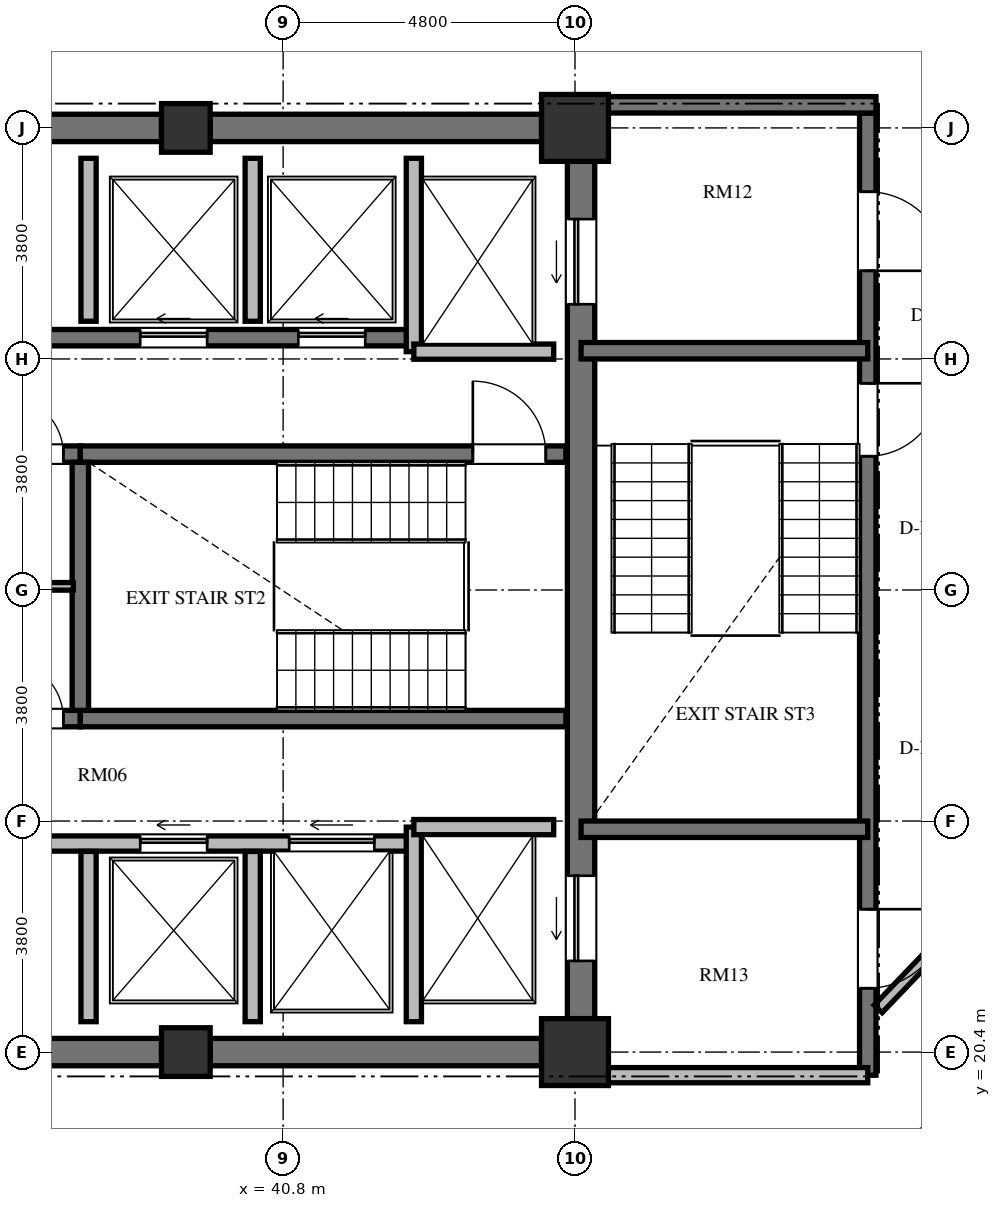
"""IFC4 building model, lengths in metres.
Left out: names, types, materials, properties, quantities, classifications, styles, units other than length and angle.
Written with IfcOpenShell. Run it as: python <this file> out.ifc"""

import sys

from ifc_helpers import new_model, si_unit, direction, frame, frame_2d, origin, origin_2d, place, context, subcontext, project, spatial, rectangle, extrude, element, fill, save


model = new_model("IFC4")
c1 = context("Model", 3, precision=1e-05, world=origin(), true_north=direction((0.0, 1.0)))
c2 = subcontext(c1, "Body", "Model", "MODEL_VIEW")
j1 = project(units=[si_unit("LENGTHUNIT", "METRE"), si_unit("PLANEANGLEUNIT", "RADIAN")], contexts=[c1])
p1 = place(None, origin())
s1 = spatial("IfcSite", under=j1, at=p1, CompositionType="ELEMENT")
p2 = place(p1, origin())
s2 = spatial("IfcBuilding", under=s1, at=p2, CompositionType="ELEMENT")
p3 = place(p2, frame((0.0, 0.0, 262.32)))
s3 = spatial("IfcBuildingStorey", under=s2, at=p3, CompositionType="ELEMENT", Elevation=262.32)
p4 = place(p3, frame((39.2, 20.4, 0.0), z_axis=(0.0, 0.0, 1.0), x_axis=(1.0, 0.0, 0.0)))
e1 = element("IfcColumn", 1, at=p4, inside=s3, PredefinedType="COLUMN", context=c2, shape_type="SweptSolid", body=[
    extrude(rectangle(XDim=0.8, YDim=0.8, at=origin_2d()), origin(), (0.0, 0.0, 1.0), 3.648),
])
for number, where, z_axis, x_axis in (
    (2, (45.6, 20.4, 0.0), (0.0, 0.0, 1.0), (1.0, 0.0, 0.0)),
    (3, (45.6, 35.6, 0.0), (0.0, 0.0, 1.0), (1.0, 0.0, 0.0)),
):
    element("IfcColumn", number, at=place(p3, frame(where, z_axis=z_axis, x_axis=x_axis)), inside=s3, PredefinedType="COLUMN", context=c2, shape_type="SweptSolid", body=[
        extrude(rectangle(XDim=1.1, YDim=1.1, at=origin_2d()), origin(), (0.0, 0.0, 1.0), 3.648),
    ])
p5 = place(p3, frame((39.2, 35.6, 0.0), z_axis=(0.0, 0.0, 1.0), x_axis=(1.0, 0.0, 0.0)))
e4 = element("IfcColumn", 4, at=p5, inside=s3, PredefinedType="COLUMN", context=c2, shape_type="SweptSolid", body=[
    extrude(rectangle(XDim=0.8, YDim=0.8, at=origin_2d()), origin(), (0.0, 0.0, 1.0), 3.648),
])
p6 = place(p3, frame((45.7, 20.95, 0.0), z_axis=(0.0, 0.0, 1.0), x_axis=(0.0, 1.0, 0.0)))
e5 = element("IfcWall", 5, at=p6, inside=s3, PredefinedType="SHEAR", context=c2, shape_type="SweptSolid", body=[
    extrude(rectangle(XDim=14.1, YDim=0.45, at=frame_2d((7.05, 0.0))), origin(), (0.0, 0.0, 1.0), 3.648),
])
p7 = place(p6, frame((11.75, 0.0, 0.0)))
e6 = element("IfcOpeningElement", 6, at=p7, cuts=e5, PredefinedType="OPENING", context=c2, shape_type="SweptSolid", body=[
    extrude(rectangle(XDim=1.4, YDim=2.3, at=frame_2d((0.7, 1.15))), frame((0.0, 0.235, 0.0), z_axis=(0.0, -1.0, 0.0), x_axis=(1.0, 0.0, 0.0)), (0.0, 0.0, 1.0), 0.47),
])
p8 = place(p6, frame((0.95, 0.0, 0.0)))
e7 = element("IfcOpeningElement", 7, at=p8, cuts=e5, PredefinedType="OPENING", context=c2, shape_type="SweptSolid", body=[
    extrude(rectangle(XDim=1.4, YDim=2.3, at=frame_2d((0.7, 1.15))), frame((0.0, 0.235, 0.0), z_axis=(0.0, -1.0, 0.0), x_axis=(1.0, 0.0, 0.0)), (0.0, 0.0, 1.0), 0.47),
])
for number, where, z_axis, x_axis in (
    (8, (33.2, 20.4, 0.0), (0.0, 0.0, 1.0), (1.0, 0.0, 0.0)),
    (9, (33.2, 35.6, 0.0), (0.0, 0.0, 1.0), (1.0, 0.0, 0.0)),
):
    element("IfcWall", number, at=place(p3, frame(where, z_axis=z_axis, x_axis=x_axis)), inside=s3, PredefinedType="SHEAR", context=c2, shape_type="SweptSolid", body=[
        extrude(rectangle(XDim=5.6, YDim=0.45, at=frame_2d((2.8, 0.0))), origin(), (0.0, 0.0, 1.0), 3.648),
    ])
for number, where, z_axis, x_axis in (
    (10, (39.6, 20.4, 0.0), (0.0, 0.0, 1.0), (1.0, 0.0, 0.0)),
    (11, (39.6, 35.6, 0.0), (0.0, 0.0, 1.0), (1.0, 0.0, 0.0)),
):
    element("IfcWall", number, at=place(p3, frame(where, z_axis=z_axis, x_axis=x_axis)), inside=s3, PredefinedType="SHEAR", context=c2, shape_type="SweptSolid", body=[
        extrude(rectangle(XDim=5.45, YDim=0.45, at=frame_2d((2.725, 0.0))), origin(), (0.0, 0.0, 1.0), 3.648),
    ])
p9 = place(p3, frame((34.535, 30.235, 0.0), z_axis=(0.0, 0.0, 1.0), x_axis=(1.0, 0.0, 0.0)))
e12 = element("IfcWall", 12, at=p9, inside=s3, PredefinedType="SHEAR", context=c2, shape_type="SweptSolid", body=[
    extrude(rectangle(XDim=2.93, YDim=0.27, at=frame_2d((1.465, 0.0))), origin(), (0.0, 0.0, 1.0), 3.648),
])
p10 = place(p9, frame((0.255, 0.0, 0.0)))
e13 = element("IfcOpeningElement", 13, at=p10, cuts=e12, PredefinedType="OPENING", context=c2, shape_type="SweptSolid", body=[
    extrude(rectangle(XDim=1.0, YDim=2.1, at=frame_2d((0.5, 1.05))), frame((0.0, 0.145, 0.0), z_axis=(0.0, -1.0, 0.0), x_axis=(1.0, 0.0, 0.0)), (0.0, 0.0, 1.0), 0.29),
])
p11 = place(p9, frame((1.7, 0.0, 0.0)))
e14 = element("IfcOpeningElement", 14, at=p11, cuts=e12, PredefinedType="OPENING", context=c2, shape_type="SweptSolid", body=[
    extrude(rectangle(XDim=0.95, YDim=2.1, at=frame_2d((0.475, 1.05))), frame((0.0, 0.145, 0.0), z_axis=(0.0, -1.0, 0.0), x_axis=(1.0, 0.0, 0.0)), (0.0, 0.0, 1.0), 0.29),
])
p12 = place(p3, frame((37.465, 30.235, 0.0), z_axis=(0.0, 0.0, 1.0), x_axis=(1.0, 0.0, 0.0)))
e15 = element("IfcWall", 15, at=p12, inside=s3, PredefinedType="SHEAR", context=c2, shape_type="SweptSolid", body=[
    extrude(rectangle(XDim=7.985, YDim=0.27, at=frame_2d((3.992, 0.0))), origin(), (0.0, 0.0, 1.0), 3.648),
])
p13 = place(p12, frame((6.455, 0.0, 0.0)))
e16 = element("IfcOpeningElement", 16, at=p13, cuts=e15, PredefinedType="OPENING", context=c2, shape_type="SweptSolid", body=[
    extrude(rectangle(XDim=1.2, YDim=2.15, at=frame_2d((0.6, 1.075))), frame((0.0, 0.145, 0.0), z_axis=(0.0, -1.0, 0.0), x_axis=(1.0, 0.0, 0.0)), (0.0, 0.0, 1.0), 0.29),
])
p14 = place(p3, frame((34.535, 25.885, 0.0), z_axis=(0.0, 0.0, 1.0), x_axis=(1.0, 0.0, 0.0)))
e17 = element("IfcWall", 17, at=p14, inside=s3, PredefinedType="SHEAR", context=c2, shape_type="SweptSolid", body=[
    extrude(rectangle(XDim=2.93, YDim=0.27, at=frame_2d((1.465, 0.0))), origin(), (0.0, 0.0, 1.0), 3.648),
])
p15 = place(p14, frame((0.28, 0.0, 0.0)))
e18 = element("IfcOpeningElement", 18, at=p15, cuts=e17, PredefinedType="OPENING", context=c2, shape_type="SweptSolid", body=[
    extrude(rectangle(XDim=0.95, YDim=2.1, at=frame_2d((0.475, 1.05))), frame((0.0, 0.145, 0.0), z_axis=(0.0, -1.0, 0.0), x_axis=(1.0, 0.0, 0.0)), (0.0, 0.0, 1.0), 0.29),
])
p16 = place(p14, frame((1.7, 0.0, 0.0)))
e19 = element("IfcOpeningElement", 19, at=p16, cuts=e17, PredefinedType="OPENING", context=c2, shape_type="SweptSolid", body=[
    extrude(rectangle(XDim=0.95, YDim=2.1, at=frame_2d((0.475, 1.05))), frame((0.0, 0.145, 0.0), z_axis=(0.0, -1.0, 0.0), x_axis=(1.0, 0.0, 0.0)), (0.0, 0.0, 1.0), 0.29),
])
p17 = place(p3, frame((37.465, 25.885, 0.0), z_axis=(0.0, 0.0, 1.0), x_axis=(1.0, 0.0, 0.0)))
e20 = element("IfcWall", 20, at=p17, inside=s3, PredefinedType="SHEAR", context=c2, shape_type="SweptSolid", body=[
    extrude(rectangle(XDim=7.985, YDim=0.27, at=frame_2d((3.992, 0.0))), origin(), (0.0, 0.0, 1.0), 3.648),
])
p18 = place(p3, frame((37.465, 26.02, 0.0), z_axis=(0.0, 0.0, 1.0), x_axis=(0.0, 1.0, 0.0)))
e21 = element("IfcWall", 21, at=p18, inside=s3, PredefinedType="SHEAR", context=c2, shape_type="SweptSolid", body=[
    extrude(rectangle(XDim=4.08, YDim=0.27, at=frame_2d((2.04, 0.0))), origin(), (0.0, 0.0, 1.0), 3.648),
])
p19 = place(p3, frame((34.65, 28.06, 0.0), z_axis=(0.0, 0.0, 1.0), x_axis=(1.0, 0.0, 0.0)))
e22 = element("IfcWall", 22, at=p19, inside=s3, PredefinedType="PARTITIONING", context=c2, shape_type="SweptSolid", body=[
    extrude(rectangle(XDim=2.7, YDim=0.125, at=frame_2d((1.35, 0.0))), origin(), (0.0, 0.0, 1.0), 3.448),
])
p20 = place(p3, frame((26.55, 32.15, 0.0), z_axis=(0.0, 0.0, 1.0), x_axis=(1.0, 0.0, 0.0)))
e23 = element("IfcWall", 23, at=p20, inside=s3, PredefinedType="SHEAR", context=c2, shape_type="SweptSolid", body=[
    extrude(rectangle(XDim=16.4, YDim=0.27, at=frame_2d((8.2, 0.0))), origin(), (0.0, 0.0, 1.0), 3.648),
])
p21 = place(p20, frame((1.375, 0.0, 0.0)))
e24 = element("IfcOpeningElement", 24, at=p21, cuts=e23, PredefinedType="OPENING", context=c2, shape_type="SweptSolid", body=[
    extrude(rectangle(XDim=1.05, YDim=2.15, at=frame_2d((0.525, 1.075))), frame((0.0, 0.145, 0.0), z_axis=(0.0, -1.0, 0.0), x_axis=(1.0, 0.0, 0.0)), (0.0, 0.0, 1.0), 0.29),
])
p22 = place(p20, frame((4.975, 0.0, 0.0)))
e25 = element("IfcOpeningElement", 25, at=p22, cuts=e23, PredefinedType="OPENING", context=c2, shape_type="SweptSolid", body=[
    extrude(rectangle(XDim=1.05, YDim=2.15, at=frame_2d((0.525, 1.075))), frame((0.0, 0.145, 0.0), z_axis=(0.0, -1.0, 0.0), x_axis=(1.0, 0.0, 0.0)), (0.0, 0.0, 1.0), 0.29),
])
p23 = place(p20, frame((8.625, 0.0, 0.0)))
e26 = element("IfcOpeningElement", 26, at=p23, cuts=e23, PredefinedType="OPENING", context=c2, shape_type="SweptSolid", body=[
    extrude(rectangle(XDim=1.05, YDim=2.15, at=frame_2d((0.525, 1.075))), frame((0.0, 0.145, 0.0), z_axis=(0.0, -1.0, 0.0), x_axis=(1.0, 0.0, 0.0)), (0.0, 0.0, 1.0), 0.29),
])
p24 = place(p20, frame((11.9, 0.0, 0.0)))
e27 = element("IfcOpeningElement", 27, at=p24, cuts=e23, PredefinedType="OPENING", context=c2, shape_type="SweptSolid", body=[
    extrude(rectangle(XDim=1.1, YDim=2.2, at=frame_2d((0.55, 1.1))), frame((0.0, 0.145, 0.0), z_axis=(0.0, -1.0, 0.0), x_axis=(1.0, 0.0, 0.0)), (0.0, 0.0, 1.0), 0.29),
])
p25 = place(p20, frame((14.5, 0.0, 0.0)))
e28 = element("IfcOpeningElement", 28, at=p25, cuts=e23, PredefinedType="OPENING", context=c2, shape_type="SweptSolid", body=[
    extrude(rectangle(XDim=1.1, YDim=2.2, at=frame_2d((0.55, 1.1))), frame((0.0, 0.145, 0.0), z_axis=(0.0, -1.0, 0.0), x_axis=(1.0, 0.0, 0.0)), (0.0, 0.0, 1.0), 0.29),
])
p26 = place(p3, frame((26.75, 23.83, 0.0), z_axis=(0.0, 0.0, 1.0), x_axis=(1.0, 0.0, 0.0)))
e29 = element("IfcWall", 29, at=p26, inside=s3, PredefinedType="SOLIDWALL", context=c2, shape_type="SweptSolid", body=[
    extrude(rectangle(XDim=16.2, YDim=0.25, at=frame_2d((8.1, 0.0))), origin(), (0.0, 0.0, 1.0), 3.448),
])
p27 = place(p26, frame((2.025, 0.0, 0.0)))
e30 = element("IfcOpeningElement", 30, at=p27, cuts=e29, PredefinedType="OPENING", context=c2, shape_type="SweptSolid", body=[
    extrude(rectangle(XDim=1.05, YDim=2.15, at=frame_2d((0.525, 1.075))), frame((0.0, 0.135, 0.0), z_axis=(0.0, -1.0, 0.0), x_axis=(1.0, 0.0, 0.0)), (0.0, 0.0, 1.0), 0.27),
])
p28 = place(p26, frame((7.25, 0.0, 0.0)))
e31 = element("IfcOpeningElement", 31, at=p28, cuts=e29, PredefinedType="OPENING", context=c2, shape_type="SweptSolid", body=[
    extrude(rectangle(XDim=1.4, YDim=2.2, at=frame_2d((0.7, 1.1))), frame((0.0, 0.135, 0.0), z_axis=(0.0, -1.0, 0.0), x_axis=(1.0, 0.0, 0.0)), (0.0, 0.0, 1.0), 0.27),
])
p29 = place(p26, frame((11.7, 0.0, 0.0)))
e32 = element("IfcOpeningElement", 32, at=p29, cuts=e29, PredefinedType="OPENING", context=c2, shape_type="SweptSolid", body=[
    extrude(rectangle(XDim=1.1, YDim=2.2, at=frame_2d((0.55, 1.1))), frame((0.0, 0.135, 0.0), z_axis=(0.0, -1.0, 0.0), x_axis=(1.0, 0.0, 0.0)), (0.0, 0.0, 1.0), 0.27),
])
p30 = place(p26, frame((14.15, 0.0, 0.0)))
e33 = element("IfcOpeningElement", 33, at=p30, cuts=e29, PredefinedType="OPENING", context=c2, shape_type="SweptSolid", body=[
    extrude(rectangle(XDim=1.4, YDim=2.3, at=frame_2d((0.7, 1.15))), frame((0.0, 0.135, 0.0), z_axis=(0.0, -1.0, 0.0), x_axis=(1.0, 0.0, 0.0)), (0.0, 0.0, 1.0), 0.27),
])
p31 = place(p3, frame((42.95, 31.92, 0.0), z_axis=(0.0, 0.0, 1.0), x_axis=(0.0, 1.0, 0.0)))
e34 = element("IfcWall", 34, at=p31, inside=s3, PredefinedType="SOLIDWALL", context=c2, shape_type="SweptSolid", body=[
    extrude(rectangle(XDim=3.18, YDim=0.25, at=frame_2d((1.59, 0.0))), origin(), (0.0, 0.0, 1.0), 3.448),
])
p32 = place(p3, frame((42.95, 31.92, 0.0), z_axis=(0.0, 0.0, 1.0), x_axis=(1.0, 0.0, 0.0)))
e35 = element("IfcWall", 35, at=p32, inside=s3, PredefinedType="SOLIDWALL", context=c2, shape_type="SweptSolid", body=[
    extrude(rectangle(XDim=2.3, YDim=0.25, at=frame_2d((1.15, 0.0))), origin(), (0.0, 0.0, 1.0), 3.448),
])
p33 = place(p3, frame((42.95, 20.9, 0.0), z_axis=(0.0, 0.0, 1.0), x_axis=(0.0, 1.0, 0.0)))
e36 = element("IfcWall", 36, at=p33, inside=s3, PredefinedType="SOLIDWALL", context=c2, shape_type="SweptSolid", body=[
    extrude(rectangle(XDim=3.2, YDim=0.25, at=frame_2d((1.6, 0.0))), origin(), (0.0, 0.0, 1.0), 3.448),
])
p34 = place(p3, frame((42.95, 24.1, 0.0), z_axis=(0.0, 0.0, 1.0), x_axis=(1.0, 0.0, 0.0)))
e37 = element("IfcWall", 37, at=p34, inside=s3, PredefinedType="SOLIDWALL", context=c2, shape_type="SweptSolid", body=[
    extrude(rectangle(XDim=2.3, YDim=0.25, at=frame_2d((1.15, 0.0))), origin(), (0.0, 0.0, 1.0), 3.448),
])
p35 = place(p3, frame((37.6, 32.42, 0.0), z_axis=(0.0, 0.0, 1.0), x_axis=(0.0, 1.0, 0.0)))
e38 = element("IfcWall", 38, at=p35, inside=s3, PredefinedType="SOLIDWALL", context=c2, shape_type="SweptSolid", body=[
    extrude(rectangle(XDim=2.68, YDim=0.25, at=frame_2d((1.34, 0.0))), origin(), (0.0, 0.0, 1.0), 3.448),
])
p36 = place(p3, frame((37.6, 20.9, 0.0), z_axis=(0.0, 0.0, 1.0), x_axis=(0.0, 1.0, 0.0)))
e39 = element("IfcWall", 39, at=p36, inside=s3, PredefinedType="SOLIDWALL", context=c2, shape_type="SweptSolid", body=[
    extrude(rectangle(XDim=2.8, YDim=0.25, at=frame_2d((1.4, 0.0))), origin(), (0.0, 0.0, 1.0), 3.448),
])
p37 = place(p3, frame((40.3, 32.42, 0.0), z_axis=(0.0, 0.0, 1.0), x_axis=(0.0, 1.0, 0.0)))
e40 = element("IfcWall", 40, at=p37, inside=s3, PredefinedType="SOLIDWALL", context=c2, shape_type="SweptSolid", body=[
    extrude(rectangle(XDim=2.68, YDim=0.25, at=frame_2d((1.34, 0.0))), origin(), (0.0, 0.0, 1.0), 3.448),
])
p38 = place(p3, frame((40.3, 20.9, 0.0), z_axis=(0.0, 0.0, 1.0), x_axis=(0.0, 1.0, 0.0)))
e41 = element("IfcWall", 41, at=p38, inside=s3, PredefinedType="SOLIDWALL", context=c2, shape_type="SweptSolid", body=[
    extrude(rectangle(XDim=2.8, YDim=0.25, at=frame_2d((1.4, 0.0))), origin(), (0.0, 0.0, 1.0), 3.448),
])
p39 = place(p3, frame((50.415, 35.845, 0.0), z_axis=(0.0, 0.0, 1.0), x_axis=(0.0, -1.0, 0.0)))
e42 = element("IfcWall", 42, at=p39, inside=s3, PredefinedType="SHEAR", context=c2, shape_type="SweptSolid", body=[
    extrude(rectangle(XDim=15.825, YDim=0.27, at=frame_2d((7.913, 0.0))), origin(), (0.0, 0.0, 1.0), 3.648),
])
p40 = place(p39, frame((4.445, 0.0, 0.0)))
e43 = element("IfcOpeningElement", 43, at=p40, cuts=e42, PredefinedType="OPENING", context=c2, shape_type="SweptSolid", body=[
    extrude(rectangle(XDim=1.2, YDim=2.15, at=frame_2d((0.6, 1.075))), frame((0.0, 0.145, 0.0), z_axis=(0.0, -1.0, 0.0), x_axis=(1.0, 0.0, 0.0)), (0.0, 0.0, 1.0), 0.29),
])
p41 = place(p39, frame((1.295, 0.0, 0.0)))
e44 = element("IfcOpeningElement", 44, at=p41, cuts=e42, PredefinedType="OPENING", context=c2, shape_type="SweptSolid", body=[
    extrude(rectangle(XDim=1.3, YDim=2.2, at=frame_2d((0.65, 1.1))), frame((0.0, 0.145, 0.0), z_axis=(0.0, -1.0, 0.0), x_axis=(1.0, 0.0, 0.0)), (0.0, 0.0, 1.0), 0.29),
])
p42 = place(p39, frame((13.095, 0.0, 0.0)))
e45 = element("IfcOpeningElement", 45, at=p42, cuts=e42, PredefinedType="OPENING", context=c2, shape_type="SweptSolid", body=[
    extrude(rectangle(XDim=1.3, YDim=2.2, at=frame_2d((0.65, 1.1))), frame((0.0, 0.145, 0.0), z_axis=(0.0, -1.0, 0.0), x_axis=(1.0, 0.0, 0.0)), (0.0, 0.0, 1.0), 0.29),
])
p43 = place(p3, frame((45.925, 35.98, 0.0), z_axis=(0.0, 0.0, 1.0), x_axis=(1.0, 0.0, 0.0)))
e46 = element("IfcWall", 46, at=p43, inside=s3, PredefinedType="SHEAR", context=c2, shape_type="SweptSolid", body=[
    extrude(rectangle(XDim=4.625, YDim=0.27, at=frame_2d((2.312, 0.0))), origin(), (0.0, 0.0, 1.0), 3.648),
])
for number, where, z_axis, x_axis in (
    (47, (45.7, 31.935, 0.0), (0.0, 0.0, 1.0), (1.0, 0.0, 0.0)),
    (48, (45.7, 24.065, 0.0), (0.0, 0.0, 1.0), (1.0, 0.0, 0.0)),
):
    element("IfcWall", number, at=place(p3, frame(where, z_axis=z_axis, x_axis=x_axis)), inside=s3, PredefinedType="SHEAR", context=c2, shape_type="SweptSolid", body=[
        extrude(rectangle(XDim=4.715, YDim=0.27, at=frame_2d((2.357, 0.0))), origin(), (0.0, 0.0, 1.0), 3.648),
    ])
p44 = place(p3, frame((45.7, 20.02, 0.0), z_axis=(0.0, 0.0, 1.0), x_axis=(1.0, 0.0, 0.0)))
e49 = element("IfcWall", 49, at=p44, inside=s3, PredefinedType="SOLIDWALL", context=c2, shape_type="SweptSolid", body=[
    extrude(rectangle(XDim=4.715, YDim=0.25, at=frame_2d((2.357, 0.0))), origin(), (0.0, 0.0, 1.0), 3.448),
])
p45 = place(p3, frame((53.078, 23.714, 0.0), z_axis=(0.0, 0.0, 1.0), x_axis=(-0.691353379446, -0.722516785085, 0.0)))
e50 = element("IfcWall", 50, at=p45, inside=s3, PredefinedType="PARTITIONING", context=c2, shape_type="SweptSolid", body=[
    extrude(rectangle(XDim=3.604, YDim=0.18, at=frame_2d((1.802, 0.0))), origin(), (0.0, 0.0, 1.0), 3.448),
])
p46 = place(p13, origin())
e51 = element("IfcDoor", 51, at=p46, inside=s3, OperationType="SINGLE_SWING_LEFT", PredefinedType="DOOR", context=c2, shape_type="SweptSolid", body=[
    extrude(rectangle(XDim=1.2, YDim=2.15, at=frame_2d((0.6, 1.075))), frame((0.0, 0.025, 0.0), z_axis=(0.0, -1.0, 0.0), x_axis=(1.0, 0.0, 0.0)), (0.0, 0.0, 1.0), 0.05),
])
fill(e16, e51)
p47 = place(p16, origin())
e52 = element("IfcDoor", 52, at=p47, inside=s3, OperationType="SINGLE_SWING_LEFT", PredefinedType="DOOR", context=c2, shape_type="SweptSolid", body=[
    extrude(rectangle(XDim=0.95, YDim=2.1, at=frame_2d((0.475, 1.05))), frame((0.0, 0.025, 0.0), z_axis=(0.0, -1.0, 0.0), x_axis=(1.0, 0.0, 0.0)), (0.0, 0.0, 1.0), 0.05),
])
fill(e19, e52)
p48 = place(p11, origin())
e53 = element("IfcDoor", 53, at=p48, inside=s3, OperationType="SINGLE_SWING_LEFT", PredefinedType="DOOR", context=c2, shape_type="SweptSolid", body=[
    extrude(rectangle(XDim=0.95, YDim=2.1, at=frame_2d((0.475, 1.05))), frame((0.0, 0.025, 0.0), z_axis=(0.0, -1.0, 0.0), x_axis=(1.0, 0.0, 0.0)), (0.0, 0.0, 1.0), 0.05),
])
fill(e14, e53)
p49 = place(p24, origin())
e54 = element("IfcDoor", 54, at=p49, inside=s3, OperationType="SLIDING_TO_LEFT", PredefinedType="DOOR", context=c2, shape_type="SweptSolid", body=[
    extrude(rectangle(XDim=1.1, YDim=2.2, at=frame_2d((0.55, 1.1))), frame((0.0, 0.025, 0.0), z_axis=(0.0, -1.0, 0.0), x_axis=(1.0, 0.0, 0.0)), (0.0, 0.0, 1.0), 0.05),
])
fill(e27, e54)
p50 = place(p25, origin())
e55 = element("IfcDoor", 55, at=p50, inside=s3, OperationType="SLIDING_TO_LEFT", PredefinedType="DOOR", context=c2, shape_type="SweptSolid", body=[
    extrude(rectangle(XDim=1.1, YDim=2.2, at=frame_2d((0.55, 1.1))), frame((0.0, 0.025, 0.0), z_axis=(0.0, -1.0, 0.0), x_axis=(1.0, 0.0, 0.0)), (0.0, 0.0, 1.0), 0.05),
])
fill(e28, e55)
p51 = place(p29, origin())
e56 = element("IfcDoor", 56, at=p51, inside=s3, OperationType="SLIDING_TO_LEFT", PredefinedType="DOOR", context=c2, shape_type="SweptSolid", body=[
    extrude(rectangle(XDim=1.1, YDim=2.2, at=frame_2d((0.55, 1.1))), frame((0.0, 0.025, 0.0), z_axis=(0.0, -1.0, 0.0), x_axis=(1.0, 0.0, 0.0)), (0.0, 0.0, 1.0), 0.05),
])
fill(e32, e56)
p52 = place(p7, origin())
e57 = element("IfcDoor", 57, at=p52, inside=s3, OperationType="SLIDING_TO_LEFT", PredefinedType="DOOR", context=c2, shape_type="SweptSolid", body=[
    extrude(rectangle(XDim=1.4, YDim=2.3, at=frame_2d((0.7, 1.15))), frame((0.0, 0.025, 0.0), z_axis=(0.0, -1.0, 0.0), x_axis=(1.0, 0.0, 0.0)), (0.0, 0.0, 1.0), 0.05),
])
fill(e6, e57)
p53 = place(p8, origin())
e58 = element("IfcDoor", 58, at=p53, inside=s3, OperationType="SLIDING_TO_LEFT", PredefinedType="DOOR", context=c2, shape_type="SweptSolid", body=[
    extrude(rectangle(XDim=1.4, YDim=2.3, at=frame_2d((0.7, 1.15))), frame((0.0, 0.025, 0.0), z_axis=(0.0, -1.0, 0.0), x_axis=(1.0, 0.0, 0.0)), (0.0, 0.0, 1.0), 0.05),
])
fill(e7, e58)
p54 = place(p30, origin())
e59 = element("IfcDoor", 59, at=p54, inside=s3, OperationType="SLIDING_TO_LEFT", PredefinedType="DOOR", context=c2, shape_type="SweptSolid", body=[
    extrude(rectangle(XDim=1.4, YDim=2.3, at=frame_2d((0.7, 1.15))), frame((0.0, 0.025, 0.0), z_axis=(0.0, -1.0, 0.0), x_axis=(1.0, 0.0, 0.0)), (0.0, 0.0, 1.0), 0.05),
])
fill(e33, e59)
p55 = place(p40, origin())
e60 = element("IfcDoor", 60, at=p55, inside=s3, OperationType="SINGLE_SWING_LEFT", PredefinedType="DOOR", context=c2, shape_type="SweptSolid", body=[
    extrude(rectangle(XDim=1.2, YDim=2.15, at=frame_2d((0.6, 1.075))), frame((0.0, 0.025, 0.0), z_axis=(0.0, -1.0, 0.0), x_axis=(1.0, 0.0, 0.0)), (0.0, 0.0, 1.0), 0.05),
])
fill(e43, e60)
p56 = place(p41, origin())
e61 = element("IfcDoor", 61, at=p56, inside=s3, OperationType="SINGLE_SWING_RIGHT", PredefinedType="DOOR", context=c2, shape_type="SweptSolid", body=[
    extrude(rectangle(XDim=1.3, YDim=2.2, at=frame_2d((0.65, 1.1))), frame((0.0, 0.025, 0.0), z_axis=(0.0, -1.0, 0.0), x_axis=(1.0, 0.0, 0.0)), (0.0, 0.0, 1.0), 0.05),
])
fill(e44, e61)
p57 = place(p42, origin())
e62 = element("IfcDoor", 62, at=p57, inside=s3, OperationType="SINGLE_SWING_LEFT", PredefinedType="DOOR", context=c2, shape_type="SweptSolid", body=[
    extrude(rectangle(XDim=1.3, YDim=2.2, at=frame_2d((0.65, 1.1))), frame((0.0, 0.025, 0.0), z_axis=(0.0, -1.0, 0.0), x_axis=(1.0, 0.0, 0.0)), (0.0, 0.0, 1.0), 0.05),
])
fill(e45, e62)
save(model, sys.argv[1])
